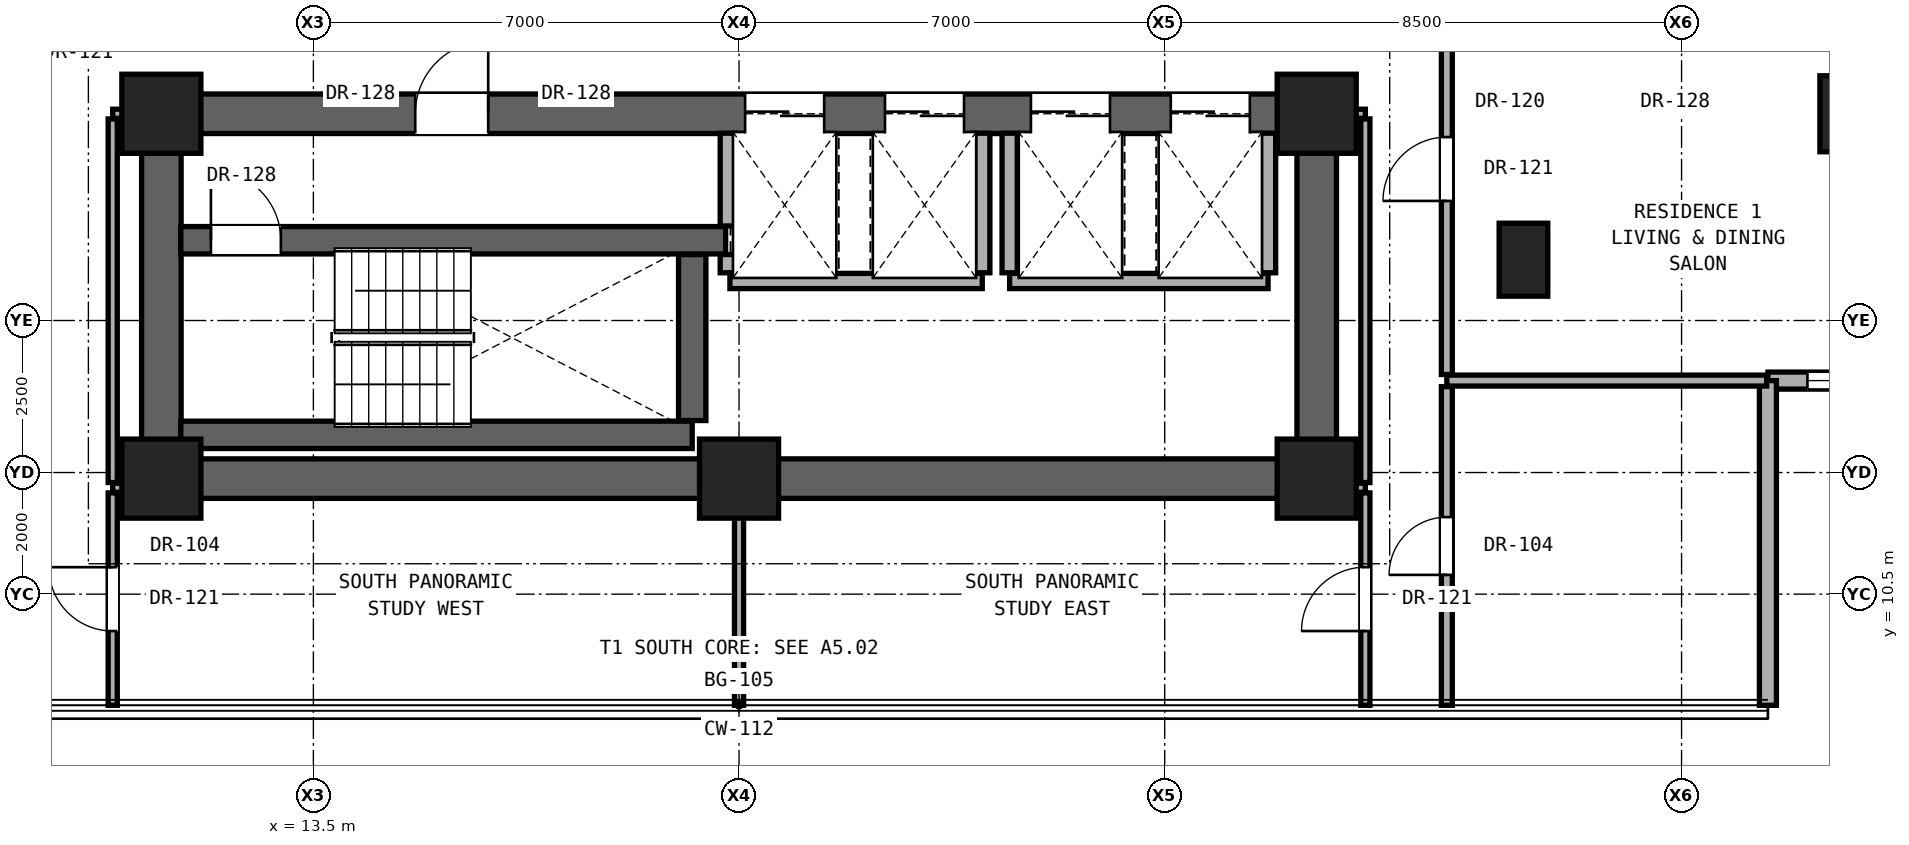
"""IFC4 building model, lengths in metres.
Left out: names, types, materials, properties, quantities, classifications, styles, units other than length and angle.
Written with IfcOpenShell. Run it as: python <this file> out.ifc"""

import sys

from ifc_helpers import new_model, si_unit, direction, frame, frame_2d, origin, origin_2d, place, context, subcontext, project, spatial, rectangle, hollow_rectangle, extrude, element, fill, save


model = new_model("IFC4")
c1 = context("Model", 3, precision=1e-05, world=origin(), true_north=direction((0.0, 1.0)))
c2 = subcontext(c1, "Body", "Model", "MODEL_VIEW")
j1 = project(units=[si_unit("LENGTHUNIT", "METRE"), si_unit("PLANEANGLEUNIT", "RADIAN")], contexts=[c1])
p1 = place(None, origin())
s1 = spatial("IfcSite", under=j1, at=p1, CompositionType="ELEMENT")
p2 = place(p1, origin())
s2 = spatial("IfcBuilding", under=s1, at=p2, CompositionType="ELEMENT")
p3 = place(p2, frame((0.0, 0.0, 71.9)))
s3 = spatial("IfcBuildingStorey", under=s2, at=p3, CompositionType="ELEMENT", Elevation=71.9)
for number, where, z_axis, x_axis in (
    (1, (11.0, 12.4, 0.0), (0.0, 0.0, 1.0), (1.0, 0.0, 0.0)),
    (2, (20.5, 12.4, 0.0), (0.0, 0.0, 1.0), (1.0, 0.0, 0.0)),
    (3, (30.0, 12.4, 0.0), (0.0, 0.0, 1.0), (1.0, 0.0, 0.0)),
    (4, (11.0, 18.4, 0.0), (0.0, 0.0, 1.0), (1.0, 0.0, 0.0)),
    (5, (30.0, 18.4, 0.0), (0.0, 0.0, 1.0), (1.0, 0.0, 0.0)),
):
    element("IfcColumn", number, at=place(p3, frame(where, z_axis=z_axis, x_axis=x_axis)), inside=s3, PredefinedType="COLUMN", context=c2, shape_type="SweptSolid", body=[
        extrude(rectangle(XDim=1.3, YDim=1.3, at=origin_2d()), origin(), (0.0, 0.0, 1.0), 3.3),
    ])
p4 = place(p3, frame((38.9, 18.4, 0.0), z_axis=(0.0, 0.0, 1.0), x_axis=(1.0, 0.0, 0.0)))
e6 = element("IfcColumn", 6, at=p4, inside=s3, PredefinedType="COLUMN", context=c2, shape_type="SweptSolid", body=[
    extrude(hollow_rectangle(XDim=1.25, YDim=1.25, WallThickness=0.07, at=origin_2d()), origin(), (0.0, 0.0, 1.0), 3.3),
])
p5 = place(p3, frame((33.4, 16.0, 0.0), z_axis=(0.0, 0.0, 1.0), x_axis=(1.0, 0.0, 0.0)))
e7 = element("IfcColumn", 7, at=p5, inside=s3, PredefinedType="PILASTER", context=c2, shape_type="SweptSolid", body=[
    extrude(rectangle(XDim=0.8, YDim=1.2, at=origin_2d()), origin(), (0.0, 0.0, 1.0), 3.3),
])
p6 = place(p3, frame((11.0, 12.4, 0.0), z_axis=(0.0, 0.0, 1.0), x_axis=(1.0, 0.0, 0.0)))
e8 = element("IfcWall", 8, at=p6, inside=s3, PredefinedType="SHEAR", context=c2, shape_type="SweptSolid", body=[
    extrude(rectangle(XDim=19.0, YDim=0.65, at=frame_2d((9.5, 0.0))), origin(), (0.0, 0.0, 1.0), 3.06),
])
for number, where, z_axis, x_axis in (
    (9, (11.0, 12.4, 0.0), (0.0, 0.0, 1.0), (0.0, 1.0, 0.0)),
    (10, (30.0, 12.4, 0.0), (0.0, 0.0, 1.0), (0.0, 1.0, 0.0)),
):
    element("IfcWall", number, at=place(p3, frame(where, z_axis=z_axis, x_axis=x_axis)), inside=s3, PredefinedType="SHEAR", context=c2, shape_type="SweptSolid", body=[
        extrude(rectangle(XDim=6.0, YDim=0.65, at=frame_2d((3.0, 0.0))), origin(), (0.0, 0.0, 1.0), 3.06),
    ])
p7 = place(p3, frame((11.0, 18.4, 0.0), z_axis=(0.0, 0.0, 1.0), x_axis=(1.0, 0.0, 0.0)))
e11 = element("IfcWall", 11, at=p7, inside=s3, PredefinedType="SHEAR", context=c2, shape_type="SweptSolid", body=[
    extrude(rectangle(XDim=19.0, YDim=0.65, at=frame_2d((9.5, 0.0))), origin(), (0.0, 0.0, 1.0), 3.06),
])
p8 = place(p7, frame((4.175, 0.0, 0.0)))
e12 = element("IfcOpeningElement", 12, at=p8, cuts=e11, PredefinedType="OPENING", context=c2, shape_type="SweptSolid", body=[
    extrude(rectangle(XDim=1.2, YDim=2.25, at=frame_2d((0.6, 1.125))), frame((0.0, 0.335, 0.0), z_axis=(0.0, -1.0, 0.0), x_axis=(1.0, 0.0, 0.0)), (0.0, 0.0, 1.0), 0.67),
])
p9 = place(p7, frame((9.6, 0.0, 0.0)))
e13 = element("IfcOpeningElement", 13, at=p9, cuts=e11, PredefinedType="OPENING", context=c2, shape_type="SweptSolid", body=[
    extrude(rectangle(XDim=1.3, YDim=2.3, at=frame_2d((0.65, 1.15))), frame((0.0, 0.335, 0.0), z_axis=(0.0, -1.0, 0.0), x_axis=(1.0, 0.0, 0.0)), (0.0, 0.0, 1.0), 0.67),
])
p10 = place(p7, frame((11.9, 0.0, 0.0)))
e14 = element("IfcOpeningElement", 14, at=p10, cuts=e11, PredefinedType="OPENING", context=c2, shape_type="SweptSolid", body=[
    extrude(rectangle(XDim=1.3, YDim=2.3, at=frame_2d((0.65, 1.15))), frame((0.0, 0.335, 0.0), z_axis=(0.0, -1.0, 0.0), x_axis=(1.0, 0.0, 0.0)), (0.0, 0.0, 1.0), 0.67),
])
p11 = place(p7, frame((14.3, 0.0, 0.0)))
e15 = element("IfcOpeningElement", 15, at=p11, cuts=e11, PredefinedType="OPENING", context=c2, shape_type="SweptSolid", body=[
    extrude(rectangle(XDim=1.3, YDim=2.3, at=frame_2d((0.65, 1.15))), frame((0.0, 0.335, 0.0), z_axis=(0.0, -1.0, 0.0), x_axis=(1.0, 0.0, 0.0)), (0.0, 0.0, 1.0), 0.67),
])
p12 = place(p7, frame((16.6, 0.0, 0.0)))
e16 = element("IfcOpeningElement", 16, at=p12, cuts=e11, PredefinedType="OPENING", context=c2, shape_type="SweptSolid", body=[
    extrude(rectangle(XDim=1.3, YDim=2.3, at=frame_2d((0.65, 1.15))), frame((0.0, 0.335, 0.0), z_axis=(0.0, -1.0, 0.0), x_axis=(1.0, 0.0, 0.0)), (0.0, 0.0, 1.0), 0.67),
])
p13 = place(p3, frame((37.42, 14.012, 0.0), z_axis=(0.0, 0.0, 1.0), x_axis=(1.0, 0.0, 0.0)))
e17 = element("IfcWall", 17, at=p13, inside=s3, PredefinedType="SOLIDWALL", context=c2, shape_type="SweptSolid", body=[
    extrude(rectangle(XDim=5.34, YDim=0.28, at=frame_2d((2.67, 0.0))), origin(), (0.0, 0.0, 1.0), 3.04),
])
p14 = place(p13, frame((0.65, 0.0, 0.85)))
e18 = element("IfcOpeningElement", 18, at=p14, cuts=e17, PredefinedType="OPENING", context=c2, shape_type="SweptSolid", body=[
    extrude(rectangle(XDim=1.1, YDim=2.0, at=frame_2d((0.55, 1.0))), frame((0.0, 0.15, 0.0), z_axis=(0.0, -1.0, 0.0), x_axis=(1.0, 0.0, 0.0)), (0.0, 0.0, 1.0), 0.3),
])
p15 = place(p3, frame((37.42, 8.672, 0.0), z_axis=(0.0, 0.0, 1.0), x_axis=(0.0, 1.0, 0.0)))
e19 = element("IfcWall", 19, at=p15, inside=s3, PredefinedType="SOLIDWALL", context=c2, shape_type="SweptSolid", body=[
    extrude(rectangle(XDim=5.34, YDim=0.28, at=frame_2d((2.67, 0.0))), origin(), (0.0, 0.0, 1.0), 3.04),
])
for number, where, z_axis, x_axis in (
    (20, (10.2, 12.25, 0.0), (0.0, 0.0, 1.0), (1.0, 0.0, 0.0)),
    (21, (30.32, 12.25, 0.0), (0.0, 0.0, 1.0), (1.0, 0.0, 0.0)),
):
    element("IfcWall", number, at=place(p3, frame(where, z_axis=z_axis, x_axis=x_axis)), inside=s3, PredefinedType="PARTITIONING", context=c2, shape_type="SweptSolid", body=[
        extrude(rectangle(XDim=0.48, YDim=0.15, at=frame_2d((0.24, 0.0))), origin(), (0.0, 0.0, 1.0), 3.06),
    ])
p16 = place(p3, frame((11.32, 13.12, 0.0), z_axis=(0.0, 0.0, 1.0), x_axis=(1.0, 0.0, 0.0)))
e22 = element("IfcWall", 22, at=p16, inside=s3, PredefinedType="SHEAR", context=c2, shape_type="SweptSolid", body=[
    extrude(rectangle(XDim=8.41, YDim=0.45, at=frame_2d((4.205, 0.0))), origin(), (0.0, 0.0, 1.0), 3.06),
])
p17 = place(p3, frame((32.14, 14.012, 0.0), z_axis=(0.0, 0.0, 1.0), x_axis=(1.0, 0.0, 0.0)))
e23 = element("IfcWall", 23, at=p17, inside=s3, PredefinedType="PARTITIONING", context=c2, shape_type="SweptSolid", body=[
    extrude(rectangle(XDim=5.26, YDim=0.18, at=frame_2d((2.63, 0.0))), origin(), (0.0, 0.0, 1.0), 3.06),
])
p18 = place(p3, frame((20.35, 15.65, 0.0), z_axis=(0.0, 0.0, 1.0), x_axis=(1.0, 0.0, 0.0)))
e24 = element("IfcWall", 24, at=p18, inside=s3, PredefinedType="SOLIDWALL", context=c2, shape_type="SweptSolid", body=[
    extrude(rectangle(XDim=4.15, YDim=0.25, at=frame_2d((2.075, 0.0))), origin(), (0.0, 0.0, 1.0), 3.06),
])
p19 = place(p3, frame((24.95, 15.65, 0.0), z_axis=(0.0, 0.0, 1.0), x_axis=(1.0, 0.0, 0.0)))
e25 = element("IfcWall", 25, at=p19, inside=s3, PredefinedType="SOLIDWALL", context=c2, shape_type="SweptSolid", body=[
    extrude(rectangle(XDim=4.25, YDim=0.25, at=frame_2d((2.125, 0.0))), origin(), (0.0, 0.0, 1.0), 3.06),
])
p20 = place(p3, frame((11.32, 16.32, 0.0), z_axis=(0.0, 0.0, 1.0), x_axis=(1.0, 0.0, 0.0)))
e26 = element("IfcWall", 26, at=p20, inside=s3, PredefinedType="SHEAR", context=c2, shape_type="SweptSolid", body=[
    extrude(rectangle(XDim=8.96, YDim=0.45, at=frame_2d((4.48, 0.0))), origin(), (0.0, 0.0, 1.0), 3.06),
])
p21 = place(p20, frame((0.495, 0.0, 0.0)))
e27 = element("IfcOpeningElement", 27, at=p21, cuts=e26, PredefinedType="OPENING", context=c2, shape_type="SweptSolid", body=[
    extrude(rectangle(XDim=1.15, YDim=2.2, at=frame_2d((0.575, 1.1))), frame((0.0, 0.235, 0.0), z_axis=(0.0, -1.0, 0.0), x_axis=(1.0, 0.0, 0.0)), (0.0, 0.0, 1.0), 0.47),
])
for number, where, z_axis, x_axis in (
    (28, (10.2, 18.4, 0.0), (0.0, 0.0, 1.0), (1.0, 0.0, 0.0)),
    (29, (30.32, 18.4, 0.0), (0.0, 0.0, 1.0), (1.0, 0.0, 0.0)),
):
    element("IfcWall", number, at=place(p3, frame(where, z_axis=z_axis, x_axis=x_axis)), inside=s3, PredefinedType="PARTITIONING", context=c2, shape_type="SweptSolid", body=[
        extrude(rectangle(XDim=0.48, YDim=0.15, at=frame_2d((0.24, 0.0))), origin(), (0.0, 0.0, 1.0), 2.436),
    ])
p22 = place(p3, frame((10.2, 8.672, 0.0), z_axis=(0.0, 0.0, 1.0), x_axis=(0.0, 1.0, 0.0)))
e30 = element("IfcWall", 30, at=p22, inside=s3, PredefinedType="PARTITIONING", context=c2, shape_type="SweptSolid", body=[
    extrude(rectangle(XDim=3.493, YDim=0.15, at=frame_2d((1.747, 0.0))), origin(), (0.0, 0.0, 1.0), 3.06),
])
p23 = place(p22, frame((1.221, 0.0, 0.0)))
e31 = element("IfcOpeningElement", 31, at=p23, cuts=e30, PredefinedType="OPENING", context=c2, shape_type="SweptSolid", body=[
    extrude(rectangle(XDim=1.05, YDim=2.2, at=frame_2d((0.525, 1.1))), frame((0.0, 0.085, 0.0), z_axis=(0.0, -1.0, 0.0), x_axis=(1.0, 0.0, 0.0)), (0.0, 0.0, 1.0), 0.17),
])
p24 = place(p3, frame((10.2, 12.335, 0.0), z_axis=(0.0, 0.0, 1.0), x_axis=(0.0, 1.0, 0.0)))
e32 = element("IfcWall", 32, at=p24, inside=s3, PredefinedType="PARTITIONING", context=c2, shape_type="SweptSolid", body=[
    extrude(rectangle(XDim=5.98, YDim=0.15, at=frame_2d((2.99, 0.0))), origin(), (0.0, 0.0, 1.0), 2.436),
])
p25 = place(p3, frame((19.73, 13.355, 0.0), z_axis=(0.0, 0.0, 1.0), x_axis=(0.0, 1.0, 0.0)))
e33 = element("IfcWall", 33, at=p25, inside=s3, PredefinedType="SHEAR", context=c2, shape_type="SweptSolid", body=[
    extrude(rectangle(XDim=2.73, YDim=0.45, at=frame_2d((1.365, 0.0))), origin(), (0.0, 0.0, 1.0), 3.06),
])
p26 = place(p3, frame((20.315, 15.785, 0.0), z_axis=(0.0, 0.0, 1.0), x_axis=(0.0, 1.0, 0.0)))
e34 = element("IfcWall", 34, at=p26, inside=s3, PredefinedType="SOLIDWALL", context=c2, shape_type="SweptSolid", body=[
    extrude(rectangle(XDim=0.3, YDim=0.25, at=frame_2d((0.15, 0.0))), origin(), (0.0, 0.0, 1.0), 3.06),
])
p27 = place(p3, frame((20.315, 16.555, 0.0), z_axis=(0.0, 0.0, 1.0), x_axis=(0.0, 1.0, 0.0)))
e35 = element("IfcWall", 35, at=p27, inside=s3, PredefinedType="SOLIDWALL", context=c2, shape_type="SweptSolid", body=[
    extrude(rectangle(XDim=1.525, YDim=0.25, at=frame_2d((0.763, 0.0))), origin(), (0.0, 0.0, 1.0), 3.06),
])
p28 = place(p3, frame((20.5, 8.672, 0.0), z_axis=(0.0, 0.0, 1.0), x_axis=(0.0, 1.0, 0.0)))
e36 = element("IfcWall", 36, at=p28, inside=s3, PredefinedType="PARTITIONING", context=c2, shape_type="SweptSolid", body=[
    extrude(rectangle(XDim=3.408, YDim=0.15, at=frame_2d((1.704, 0.0))), origin(), (0.0, 0.0, 1.0), 3.06),
])
for number, where, z_axis, x_axis in (
    (37, (24.5, 15.785, 0.0), (0.0, 0.0, 1.0), (0.0, 1.0, 0.0)),
    (38, (24.95, 15.785, 0.0), (0.0, 0.0, 1.0), (0.0, 1.0, 0.0)),
    (39, (29.2, 15.785, 0.0), (0.0, 0.0, 1.0), (0.0, 1.0, 0.0)),
):
    element("IfcWall", number, at=place(p3, frame(where, z_axis=z_axis, x_axis=x_axis)), inside=s3, PredefinedType="SOLIDWALL", context=c2, shape_type="SweptSolid", body=[
        extrude(rectangle(XDim=2.295, YDim=0.25, at=frame_2d((1.147, 0.0))), origin(), (0.0, 0.0, 1.0), 3.06),
    ])
p29 = place(p3, frame((30.8, 8.672, 0.0), z_axis=(0.0, 0.0, 1.0), x_axis=(0.0, 1.0, 0.0)))
e40 = element("IfcWall", 40, at=p29, inside=s3, PredefinedType="PARTITIONING", context=c2, shape_type="SweptSolid", body=[
    extrude(rectangle(XDim=3.493, YDim=0.15, at=frame_2d((1.747, 0.0))), origin(), (0.0, 0.0, 1.0), 3.06),
])
p30 = place(p29, frame((1.221, 0.0, 0.0)))
e41 = element("IfcOpeningElement", 41, at=p30, cuts=e40, PredefinedType="OPENING", context=c2, shape_type="SweptSolid", body=[
    extrude(rectangle(XDim=1.05, YDim=2.2, at=frame_2d((0.525, 1.1))), frame((0.0, 0.085, 0.0), z_axis=(0.0, -1.0, 0.0), x_axis=(1.0, 0.0, 0.0)), (0.0, 0.0, 1.0), 0.17),
])
p31 = place(p3, frame((30.8, 12.335, 0.0), z_axis=(0.0, 0.0, 1.0), x_axis=(0.0, 1.0, 0.0)))
e42 = element("IfcWall", 42, at=p31, inside=s3, PredefinedType="PARTITIONING", context=c2, shape_type="SweptSolid", body=[
    extrude(rectangle(XDim=5.98, YDim=0.15, at=frame_2d((2.99, 0.0))), origin(), (0.0, 0.0, 1.0), 2.436),
])
p32 = place(p3, frame((32.14, 8.672, 0.0), z_axis=(0.0, 0.0, 1.0), x_axis=(0.0, 1.0, 0.0)))
e43 = element("IfcWall", 43, at=p32, inside=s3, PredefinedType="PARTITIONING", context=c2, shape_type="SweptSolid", body=[
    extrude(rectangle(XDim=5.24, YDim=0.18, at=frame_2d((2.62, 0.0))), origin(), (0.0, 0.0, 1.0), 3.06),
])
p33 = place(p32, frame((2.145, 0.0, 0.0)))
e44 = element("IfcOpeningElement", 44, at=p33, cuts=e43, PredefinedType="OPENING", context=c2, shape_type="SweptSolid", body=[
    extrude(rectangle(XDim=0.95, YDim=2.15, at=frame_2d((0.475, 1.075))), frame((0.0, 0.1, 0.0), z_axis=(0.0, -1.0, 0.0), x_axis=(1.0, 0.0, 0.0)), (0.0, 0.0, 1.0), 0.2),
])
p34 = place(p3, frame((32.14, 14.112, 0.0), z_axis=(0.0, 0.0, 1.0), x_axis=(0.0, 1.0, 0.0)))
e45 = element("IfcWall", 45, at=p34, inside=s3, PredefinedType="PARTITIONING", context=c2, shape_type="SweptSolid", body=[
    extrude(rectangle(XDim=5.559, YDim=0.18, at=frame_2d((2.779, 0.0))), origin(), (0.0, 0.0, 1.0), 2.436),
])
p35 = place(p34, frame((2.854, 0.0, 0.0)))
e46 = element("IfcOpeningElement", 46, at=p35, cuts=e45, PredefinedType="OPENING", context=c2, shape_type="SweptSolid", body=[
    extrude(rectangle(XDim=1.05, YDim=2.2, at=frame_2d((0.525, 1.1))), frame((0.0, 0.1, 0.0), z_axis=(0.0, -1.0, 0.0), x_axis=(1.0, 0.0, 0.0)), (0.0, 0.0, 1.0), 0.2),
])
p36 = place(p14, origin())
e47 = element("IfcWindow", 47, at=p36, inside=s3, PartitioningType="SINGLE_PANEL", PredefinedType="WINDOW", context=c2, shape_type="SweptSolid", body=[
    extrude(rectangle(XDim=1.1, YDim=2.0, at=frame_2d((0.55, 1.0))), frame((0.0, 0.03, 0.0), z_axis=(0.0, -1.0, 0.0), x_axis=(1.0, 0.0, 0.0)), (0.0, 0.0, 1.0), 0.06),
])
fill(e18, e47)
p37 = place(p8, origin())
e48 = element("IfcDoor", 48, at=p37, inside=s3, OperationType="SINGLE_SWING_RIGHT", PredefinedType="DOOR", context=c2, shape_type="SweptSolid", body=[
    extrude(rectangle(XDim=1.2, YDim=2.25, at=frame_2d((0.6, 1.125))), frame((0.0, 0.025, 0.0), z_axis=(0.0, -1.0, 0.0), x_axis=(1.0, 0.0, 0.0)), (0.0, 0.0, 1.0), 0.05),
])
fill(e12, e48)
p38 = place(p21, origin())
e49 = element("IfcDoor", 49, at=p38, inside=s3, OperationType="SINGLE_SWING_LEFT", PredefinedType="DOOR", context=c2, shape_type="SweptSolid", body=[
    extrude(rectangle(XDim=1.15, YDim=2.2, at=frame_2d((0.575, 1.1))), frame((0.0, 0.025, 0.0), z_axis=(0.0, -1.0, 0.0), x_axis=(1.0, 0.0, 0.0)), (0.0, 0.0, 1.0), 0.05),
])
fill(e27, e49)
p39 = place(p35, origin())
e50 = element("IfcDoor", 50, at=p39, inside=s3, OperationType="SINGLE_SWING_LEFT", PredefinedType="DOOR", context=c2, shape_type="SweptSolid", body=[
    extrude(rectangle(XDim=1.05, YDim=2.2, at=frame_2d((0.525, 1.1))), frame((0.0, 0.025, 0.0), z_axis=(0.0, -1.0, 0.0), x_axis=(1.0, 0.0, 0.0)), (0.0, 0.0, 1.0), 0.05),
])
fill(e46, e50)
p40 = place(p23, origin())
e51 = element("IfcDoor", 51, at=p40, inside=s3, OperationType="SINGLE_SWING_RIGHT", PredefinedType="DOOR", context=c2, shape_type="SweptSolid", body=[
    extrude(rectangle(XDim=1.05, YDim=2.2, at=frame_2d((0.525, 1.1))), frame((0.0, 0.025, 0.0), z_axis=(0.0, -1.0, 0.0), x_axis=(1.0, 0.0, 0.0)), (0.0, 0.0, 1.0), 0.05),
])
fill(e31, e51)
p41 = place(p30, origin())
e52 = element("IfcDoor", 52, at=p41, inside=s3, OperationType="SINGLE_SWING_LEFT", PredefinedType="DOOR", context=c2, shape_type="SweptSolid", body=[
    extrude(rectangle(XDim=1.05, YDim=2.2, at=frame_2d((0.525, 1.1))), frame((0.0, 0.025, 0.0), z_axis=(0.0, -1.0, 0.0), x_axis=(1.0, 0.0, 0.0)), (0.0, 0.0, 1.0), 0.05),
])
fill(e41, e52)
p42 = place(p33, origin())
e53 = element("IfcDoor", 53, at=p42, inside=s3, OperationType="SINGLE_SWING_LEFT", PredefinedType="DOOR", context=c2, shape_type="SweptSolid", body=[
    extrude(rectangle(XDim=0.95, YDim=2.15, at=frame_2d((0.475, 1.075))), frame((0.0, 0.025, 0.0), z_axis=(0.0, -1.0, 0.0), x_axis=(1.0, 0.0, 0.0)), (0.0, 0.0, 1.0), 0.05),
])
fill(e44, e53)
p43 = place(p9, origin())
e54 = element("IfcDoor", 54, at=p43, inside=s3, OperationType="DOUBLE_DOOR_SLIDING", PredefinedType="DOOR", context=c2, shape_type="SweptSolid", body=[
    extrude(rectangle(XDim=1.3, YDim=2.3, at=frame_2d((0.65, 1.15))), frame((0.0, 0.025, 0.0), z_axis=(0.0, -1.0, 0.0), x_axis=(1.0, 0.0, 0.0)), (0.0, 0.0, 1.0), 0.05),
])
fill(e13, e54)
p44 = place(p10, origin())
e55 = element("IfcDoor", 55, at=p44, inside=s3, OperationType="DOUBLE_DOOR_SLIDING", PredefinedType="DOOR", context=c2, shape_type="SweptSolid", body=[
    extrude(rectangle(XDim=1.3, YDim=2.3, at=frame_2d((0.65, 1.15))), frame((0.0, 0.025, 0.0), z_axis=(0.0, -1.0, 0.0), x_axis=(1.0, 0.0, 0.0)), (0.0, 0.0, 1.0), 0.05),
])
fill(e14, e55)
p45 = place(p11, origin())
e56 = element("IfcDoor", 56, at=p45, inside=s3, OperationType="DOUBLE_DOOR_SLIDING", PredefinedType="DOOR", context=c2, shape_type="SweptSolid", body=[
    extrude(rectangle(XDim=1.3, YDim=2.3, at=frame_2d((0.65, 1.15))), frame((0.0, 0.025, 0.0), z_axis=(0.0, -1.0, 0.0), x_axis=(1.0, 0.0, 0.0)), (0.0, 0.0, 1.0), 0.05),
])
fill(e15, e56)
p46 = place(p12, origin())
e57 = element("IfcDoor", 57, at=p46, inside=s3, OperationType="DOUBLE_DOOR_SLIDING", PredefinedType="DOOR", context=c2, shape_type="SweptSolid", body=[
    extrude(rectangle(XDim=1.3, YDim=2.3, at=frame_2d((0.65, 1.15))), frame((0.0, 0.025, 0.0), z_axis=(0.0, -1.0, 0.0), x_axis=(1.0, 0.0, 0.0)), (0.0, 0.0, 1.0), 0.05),
])
fill(e16, e57)
save(model, sys.argv[1])
